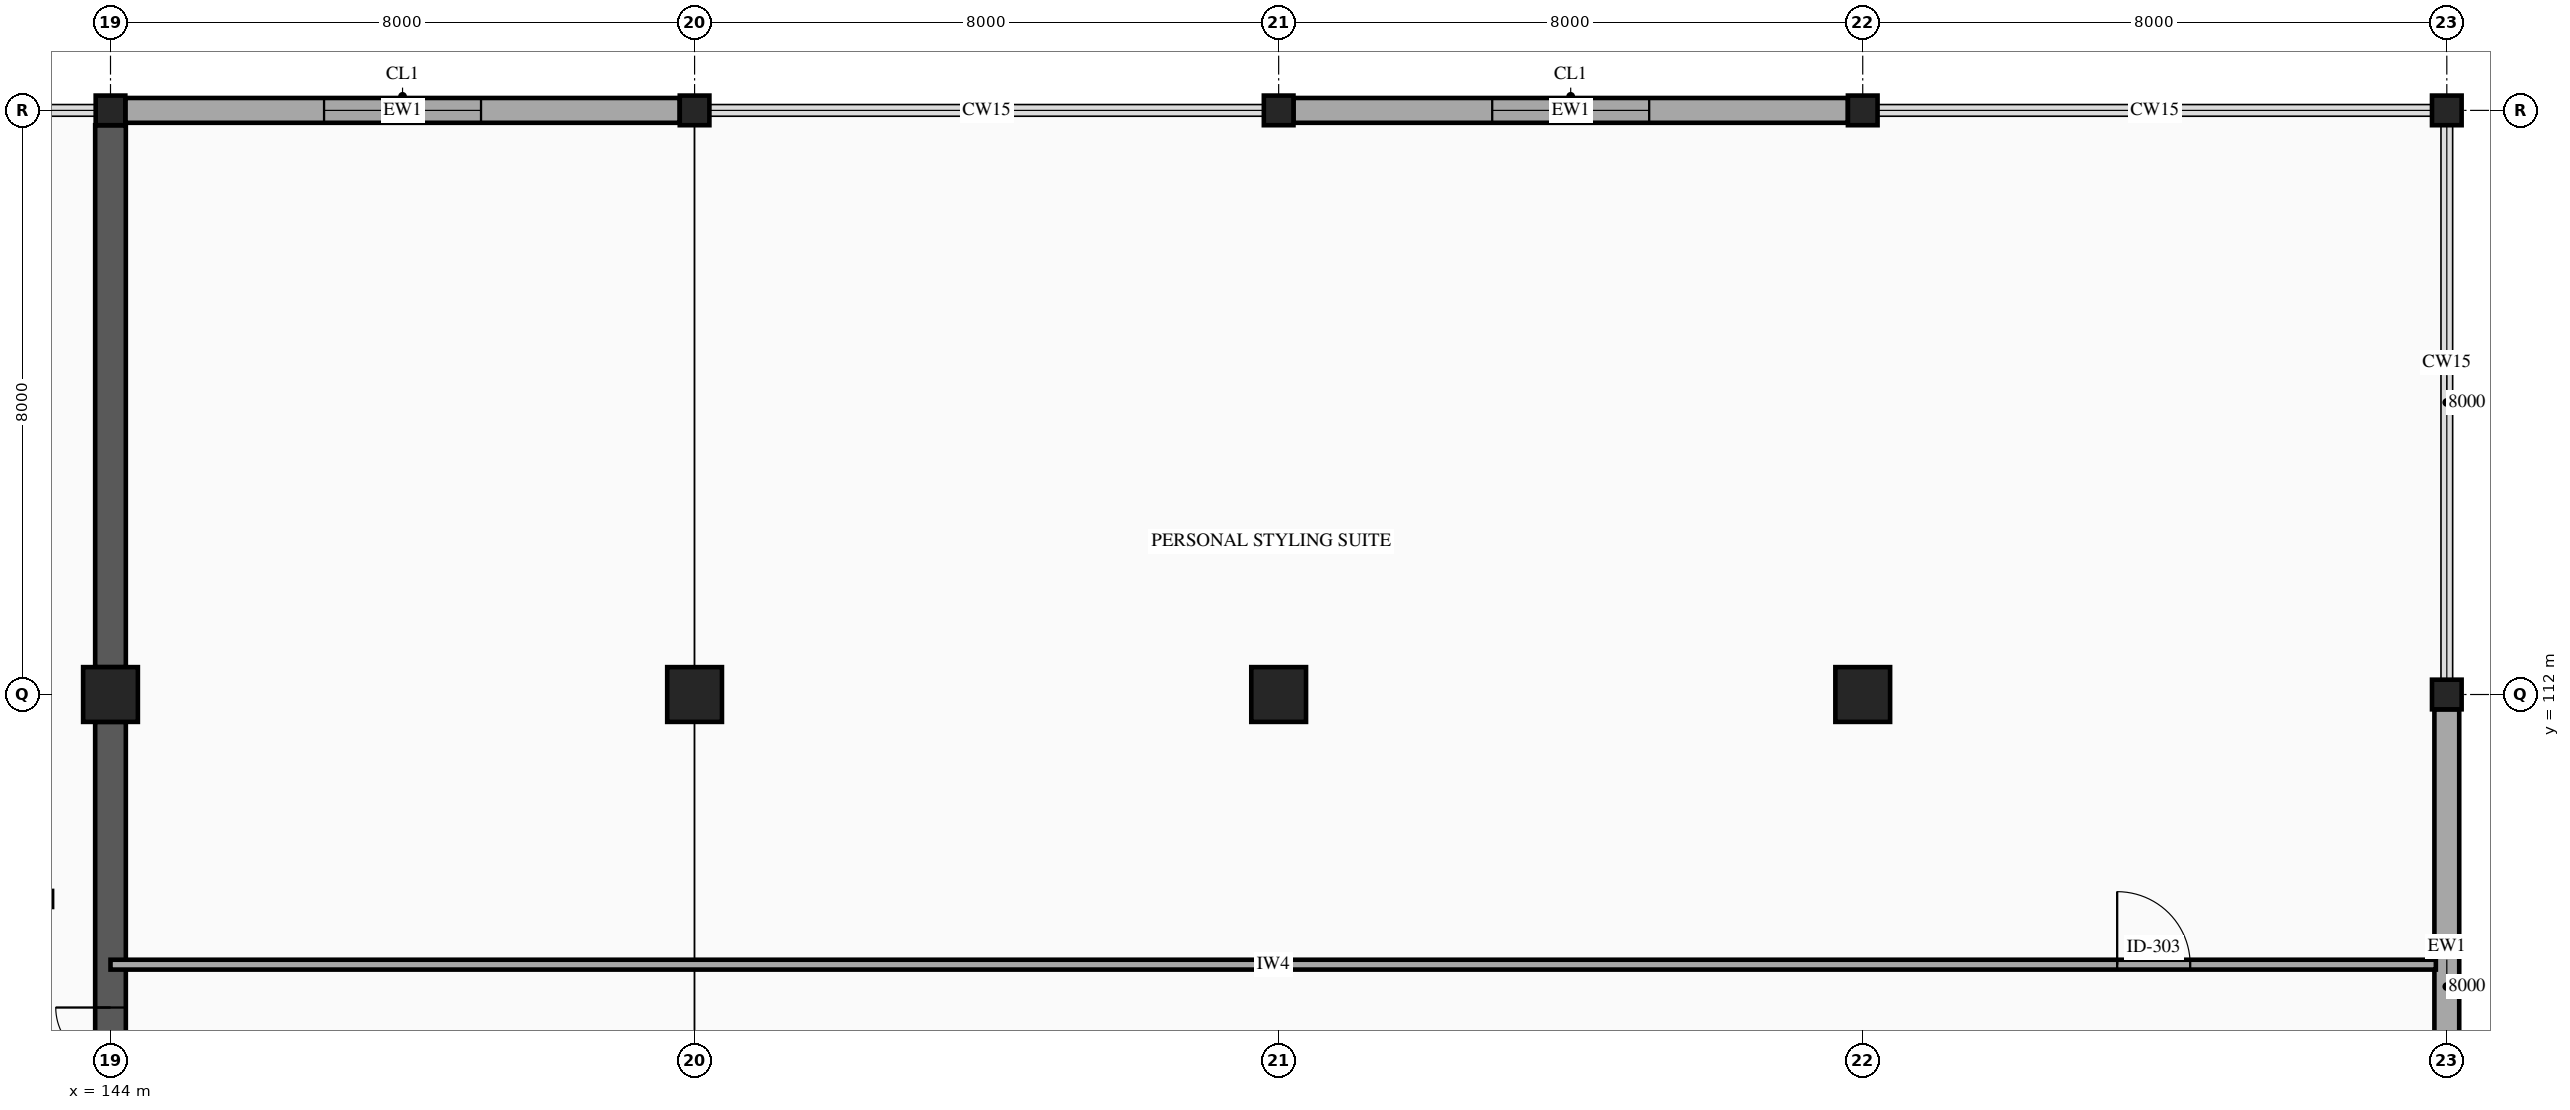
"""IFC4 building model, lengths in metres.
Left out: names, types, materials, properties, quantities, classifications, styles, units other than length and angle.
Written with IfcOpenShell. Run it as: python <this file> out.ifc"""

import sys

from ifc_helpers import new_model, si_unit, direction, frame, frame_2d, origin, origin_2d, place, context, subcontext, project, spatial, rectangle, hollow_rectangle, extrude, element, fill, save


model = new_model("IFC4")
c1 = context("Model", 3, precision=1e-05, world=origin(), true_north=direction((0.0, 1.0)))
c2 = subcontext(c1, "Body", "Model", "MODEL_VIEW")
j1 = project(units=[si_unit("LENGTHUNIT", "METRE"), si_unit("PLANEANGLEUNIT", "RADIAN")], contexts=[c1])
p1 = place(None, origin())
s1 = spatial("IfcSite", under=j1, at=p1, CompositionType="ELEMENT")
p2 = place(p1, origin())
s2 = spatial("IfcBuilding", under=s1, at=p2, CompositionType="ELEMENT")
p3 = place(p2, frame((0.0, 0.0, 5.6)))
s3 = spatial("IfcBuildingStorey", under=s2, at=p3, CompositionType="ELEMENT", Elevation=5.6)
p4 = place(p3, frame((144.0, 112.0, 0.0), z_axis=(0.0, 0.0, 1.0), x_axis=(1.0, 0.0, 0.0)))
e1 = element("IfcColumn", 1, at=p4, inside=s3, PredefinedType="COLUMN", context=c2, shape_type="SweptSolid", body=[
    extrude(rectangle(XDim=0.75, YDim=0.75, at=origin_2d()), origin(), (0.0, 0.0, 1.0), 4.8),
])
p5 = place(p3, frame((144.0, 120.0, 0.0), z_axis=(0.0, 0.0, 1.0), x_axis=(1.0, 0.0, 0.0)))
e2 = element("IfcColumn", 2, at=p5, inside=s3, PredefinedType="COLUMN", context=c2, shape_type="SweptSolid", body=[
    extrude(hollow_rectangle(XDim=0.406, YDim=0.406, WallThickness=0.015, InnerFilletRadius=0.015, OuterFilletRadius=0.029, at=origin_2d()), origin(), (0.0, 0.0, 1.0), 4.8),
])
p6 = place(p3, frame((152.0, 112.0, 0.0), z_axis=(0.0, 0.0, 1.0), x_axis=(1.0, 0.0, 0.0)))
e3 = element("IfcColumn", 3, at=p6, inside=s3, PredefinedType="COLUMN", context=c2, shape_type="SweptSolid", body=[
    extrude(rectangle(XDim=0.75, YDim=0.75, at=origin_2d()), origin(), (0.0, 0.0, 1.0), 4.8),
])
p7 = place(p3, frame((152.0, 120.0, 0.0), z_axis=(0.0, 0.0, 1.0), x_axis=(1.0, 0.0, 0.0)))
e4 = element("IfcColumn", 4, at=p7, inside=s3, PredefinedType="COLUMN", context=c2, shape_type="SweptSolid", body=[
    extrude(hollow_rectangle(XDim=0.406, YDim=0.406, WallThickness=0.015, InnerFilletRadius=0.015, OuterFilletRadius=0.029, at=origin_2d()), origin(), (0.0, 0.0, 1.0), 4.8),
])
p8 = place(p3, frame((160.0, 112.0, 0.0), z_axis=(0.0, 0.0, 1.0), x_axis=(1.0, 0.0, 0.0)))
e5 = element("IfcColumn", 5, at=p8, inside=s3, PredefinedType="COLUMN", context=c2, shape_type="SweptSolid", body=[
    extrude(rectangle(XDim=0.75, YDim=0.75, at=origin_2d()), origin(), (0.0, 0.0, 1.0), 4.8),
])
p9 = place(p3, frame((160.0, 120.0, 0.0), z_axis=(0.0, 0.0, 1.0), x_axis=(1.0, 0.0, 0.0)))
e6 = element("IfcColumn", 6, at=p9, inside=s3, PredefinedType="COLUMN", context=c2, shape_type="SweptSolid", body=[
    extrude(hollow_rectangle(XDim=0.406, YDim=0.406, WallThickness=0.015, InnerFilletRadius=0.015, OuterFilletRadius=0.029, at=origin_2d()), origin(), (0.0, 0.0, 1.0), 4.8),
])
p10 = place(p3, frame((168.0, 112.0, 0.0), z_axis=(0.0, 0.0, 1.0), x_axis=(1.0, 0.0, 0.0)))
e7 = element("IfcColumn", 7, at=p10, inside=s3, PredefinedType="COLUMN", context=c2, shape_type="SweptSolid", body=[
    extrude(rectangle(XDim=0.75, YDim=0.75, at=origin_2d()), origin(), (0.0, 0.0, 1.0), 4.8),
])
for number, where, z_axis, x_axis in (
    (8, (168.0, 120.0, 0.0), (0.0, 0.0, 1.0), (1.0, 0.0, 0.0)),
    (9, (176.0, 112.0, 0.0), (0.0, 0.0, 1.0), (1.0, 0.0, 0.0)),
    (10, (176.0, 120.0, 0.0), (0.0, 0.0, 1.0), (1.0, 0.0, 0.0)),
):
    element("IfcColumn", number, at=place(p3, frame(where, z_axis=z_axis, x_axis=x_axis)), inside=s3, PredefinedType="COLUMN", context=c2, shape_type="SweptSolid", body=[
        extrude(hollow_rectangle(XDim=0.406, YDim=0.406, WallThickness=0.015, InnerFilletRadius=0.015, OuterFilletRadius=0.029, at=origin_2d()), origin(), (0.0, 0.0, 1.0), 4.8),
    ])
p11 = place(p3, frame((144.203, 120.0, 0.0), z_axis=(0.0, 0.0, 1.0), x_axis=(1.0, 0.0, 0.0)))
e11 = element("IfcWall", 11, at=p11, inside=s3, PredefinedType="STANDARD", context=c2, shape_type="SweptSolid", body=[
    extrude(rectangle(XDim=7.594, YDim=0.34, at=frame_2d((3.797, 0.0))), origin(), (0.0, 0.0, 1.0), 3.78),
])
p12 = place(p11, frame((2.722, 0.0, 0.8)))
e12 = element("IfcOpeningElement", 12, at=p12, cuts=e11, PredefinedType="OPENING", context=c2, shape_type="SweptSolid", body=[
    extrude(rectangle(XDim=2.15, YDim=1.7, at=frame_2d((1.075, 0.85))), frame((0.0, 0.18, 0.0), z_axis=(0.0, -1.0, 0.0), x_axis=(1.0, 0.0, 0.0)), (0.0, 0.0, 1.0), 0.36),
])
p13 = place(p3, frame((160.203, 120.0, 0.0), z_axis=(0.0, 0.0, 1.0), x_axis=(1.0, 0.0, 0.0)))
e13 = element("IfcWall", 13, at=p13, inside=s3, PredefinedType="STANDARD", context=c2, shape_type="SweptSolid", body=[
    extrude(rectangle(XDim=7.594, YDim=0.34, at=frame_2d((3.797, 0.0))), origin(), (0.0, 0.0, 1.0), 3.78),
])
p14 = place(p13, frame((2.722, 0.0, 0.8)))
e14 = element("IfcOpeningElement", 14, at=p14, cuts=e13, PredefinedType="OPENING", context=c2, shape_type="SweptSolid", body=[
    extrude(rectangle(XDim=2.15, YDim=1.7, at=frame_2d((1.075, 0.85))), frame((0.0, 0.18, 0.0), z_axis=(0.0, -1.0, 0.0), x_axis=(1.0, 0.0, 0.0)), (0.0, 0.0, 1.0), 0.36),
])
p15 = place(p3, frame((176.0, 111.797, 0.0), z_axis=(0.0, 0.0, 1.0), x_axis=(0.0, -1.0, 0.0)))
e15 = element("IfcWall", 15, at=p15, inside=s3, PredefinedType="STANDARD", context=c2, shape_type="SweptSolid", body=[
    extrude(rectangle(XDim=7.594, YDim=0.34, at=frame_2d((3.797, 0.0))), origin(), (0.0, 0.0, 1.0), 3.78),
])
p16 = place(p3, frame((144.0, 104.375, 0.0), z_axis=(0.0, 0.0, 1.0), x_axis=(0.0, 1.0, 0.0)))
e16 = element("IfcWall", 16, at=p16, inside=s3, PredefinedType="SHEAR", context=c2, shape_type="SweptSolid", body=[
    extrude(rectangle(XDim=7.25, YDim=0.42, at=frame_2d((3.625, 0.0))), origin(), (0.0, 0.0, 1.0), 4.58),
])
p17 = place(p16, frame((1.838, 0.0, 0.0)))
e17 = element("IfcOpeningElement", 17, at=p17, cuts=e16, PredefinedType="OPENING", context=c2, shape_type="SweptSolid", body=[
    extrude(rectangle(XDim=1.5, YDim=2.15, at=frame_2d((0.75, 1.075))), frame((0.0, 0.22, 0.0), z_axis=(0.0, -1.0, 0.0), x_axis=(1.0, 0.0, 0.0)), (0.0, 0.0, 1.0), 0.44),
])
p18 = place(p3, frame((144.0, 112.375, 0.0), z_axis=(0.0, 0.0, 1.0), x_axis=(0.0, 1.0, 0.0)))
e18 = element("IfcWall", 18, at=p18, inside=s3, PredefinedType="SHEAR", context=c2, shape_type="SweptSolid", body=[
    extrude(rectangle(XDim=7.422, YDim=0.42, at=frame_2d((3.711, 0.0))), origin(), (0.0, 0.0, 1.0), 4.58),
])
p19 = place(p3, frame((144.0, 108.3, 0.0), z_axis=(0.0, 0.0, 1.0), x_axis=(1.0, 0.0, 0.0)))
e19 = element("IfcWall", 19, at=p19, inside=s3, PredefinedType="PARTITIONING", context=c2, shape_type="SweptSolid", body=[
    extrude(rectangle(XDim=31.85, YDim=0.135, at=frame_2d((15.925, 0.0))), origin(), (0.0, 0.0, 1.0), 3.78),
])
p20 = place(p19, frame((27.485, 0.0, 0.0)))
e20 = element("IfcOpeningElement", 20, at=p20, cuts=e19, PredefinedType="OPENING", context=c2, shape_type="SweptSolid", body=[
    extrude(rectangle(XDim=1.0, YDim=2.15, at=frame_2d((0.5, 1.075))), frame((0.0, 0.077, 0.0), z_axis=(0.0, -1.0, 0.0), x_axis=(1.0, 0.0, 0.0)), (0.0, 0.0, 1.0), 0.155),
])
p21 = place(p12, origin())
e21 = element("IfcWindow", 21, at=p21, inside=s3, PartitioningType="DOUBLE_PANEL_VERTICAL", PredefinedType="WINDOW", context=c2, shape_type="SweptSolid", body=[
    extrude(rectangle(XDim=2.15, YDim=1.7, at=frame_2d((1.075, 0.85))), frame((0.0, 0.03, 0.0), z_axis=(0.0, -1.0, 0.0), x_axis=(1.0, 0.0, 0.0)), (0.0, 0.0, 1.0), 0.06),
])
fill(e12, e21)
p22 = place(p14, origin())
e22 = element("IfcWindow", 22, at=p22, inside=s3, PartitioningType="DOUBLE_PANEL_VERTICAL", PredefinedType="WINDOW", context=c2, shape_type="SweptSolid", body=[
    extrude(rectangle(XDim=2.15, YDim=1.7, at=frame_2d((1.075, 0.85))), frame((0.0, 0.03, 0.0), z_axis=(0.0, -1.0, 0.0), x_axis=(1.0, 0.0, 0.0)), (0.0, 0.0, 1.0), 0.06),
])
fill(e14, e22)
p23 = place(p17, origin())
e23 = element("IfcDoor", 23, at=p23, inside=s3, OperationType="DOUBLE_DOOR_SINGLE_SWING", PredefinedType="DOOR", context=c2, shape_type="SweptSolid", body=[
    extrude(rectangle(XDim=1.5, YDim=2.15, at=frame_2d((0.75, 1.075))), frame((0.0, 0.025, 0.0), z_axis=(0.0, -1.0, 0.0), x_axis=(1.0, 0.0, 0.0)), (0.0, 0.0, 1.0), 0.05),
])
fill(e17, e23)
p24 = place(p20, origin())
e24 = element("IfcDoor", 24, at=p24, inside=s3, OperationType="SINGLE_SWING_LEFT", PredefinedType="DOOR", context=c2, shape_type="SweptSolid", body=[
    extrude(rectangle(XDim=1.0, YDim=2.15, at=frame_2d((0.5, 1.075))), frame((0.0, 0.025, 0.0), z_axis=(0.0, -1.0, 0.0), x_axis=(1.0, 0.0, 0.0)), (0.0, 0.0, 1.0), 0.05),
])
fill(e20, e24)
save(model, sys.argv[1])
